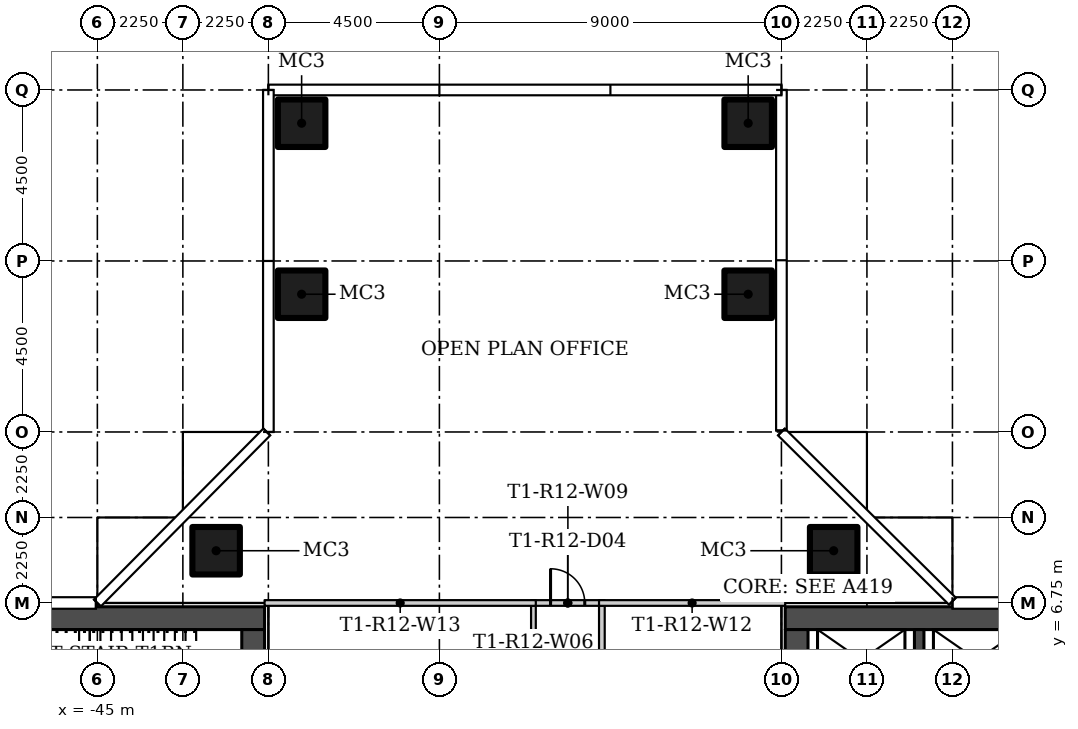
"""IFC4 building model, lengths in metres.
Left out: names, types, materials, properties, quantities, classifications, styles, units other than length and angle.
Written with IfcOpenShell. Run it as: python <this file> out.ifc"""

import sys

from ifc_helpers import new_model, si_unit, direction, frame, frame_2d, origin, origin_2d, place, context, subcontext, project, spatial, rectangle, hollow_rectangle, extrude, element, fill, save


model = new_model("IFC4")
c1 = context("Model", 3, precision=1e-05, world=origin(), true_north=direction((0.0, 1.0)))
c2 = subcontext(c1, "Body", "Model", "MODEL_VIEW")
j1 = project(units=[si_unit("LENGTHUNIT", "METRE"), si_unit("PLANEANGLEUNIT", "RADIAN")], contexts=[c1])
p1 = place(None, origin())
s1 = spatial("IfcSite", under=j1, at=p1, CompositionType="ELEMENT")
p2 = place(p1, origin())
s2 = spatial("IfcBuilding", under=s1, at=p2, CompositionType="ELEMENT")
p3 = place(p2, frame((0.0, 0.0, 113.1)))
s3 = spatial("IfcBuildingStorey", under=s2, at=p3, CompositionType="ELEMENT", Elevation=113.1)
for number, where in (
    (1, (-25.625, 8.125, 0.0)),
    (2, (-41.875, 8.125, 0.0)),
    (3, (-39.625, 14.875, 0.0)),
    (4, (-39.625, 19.375, 0.0)),
    (5, (-27.875, 14.875, 0.0)),
    (6, (-27.875, 19.375, 0.0)),
):
    element("IfcColumn", number, at=place(p3, frame(where)), inside=s3, PredefinedType="COLUMN", context=c2, shape_type="SweptSolid", body=[
        extrude(hollow_rectangle(XDim=1.25, YDim=1.25, WallThickness=0.05, at=origin_2d()), origin(), (0.0, 0.0, 1.0), 3.55),
    ])
p4 = place(p3, frame((-31.725, 6.675, 0.0), z_axis=(0.0, 0.0, 1.0), x_axis=(0.0, -1.0, 0.0)))
e7 = element("IfcWall", 7, at=p4, inside=s3, PredefinedType="PARTITIONING", context=c2, shape_type="SweptSolid", body=[
    extrude(rectangle(XDim=4.15, YDim=0.15, at=frame_2d((2.075, 0.0))), origin(), (0.0, 0.0, 1.0), 3.55),
])
p5 = place(p3, frame((-33.525, 2.513, 0.0), z_axis=(0.0, 0.0, 1.0), x_axis=(0.0, 1.0, 0.0)))
e8 = element("IfcWall", 8, at=p5, inside=s3, PredefinedType="PARTITIONING", context=c2, shape_type="SweptSolid", body=[
    extrude(rectangle(XDim=4.162, YDim=0.125, at=frame_2d((2.081, 0.0))), origin(), (0.0, 0.0, 1.0), 3.55),
])
p6 = place(p3, frame((-33.588, 6.75, 0.0)))
e9 = element("IfcWall", 9, at=p6, inside=s3, PredefinedType="PARTITIONING", context=c2, shape_type="SweptSolid", body=[
    extrude(rectangle(XDim=1.938, YDim=0.15, at=frame_2d((0.969, 0.0))), origin(), (0.0, 0.0, 1.0), 3.55),
])
p7 = place(p6, frame((0.513, 0.0, 0.0)))
e10 = element("IfcOpeningElement", 10, at=p7, cuts=e9, PredefinedType="OPENING", context=c2, shape_type="SweptSolid", body=[
    extrude(rectangle(XDim=0.9, YDim=2.1, at=frame_2d((0.45, 1.05))), frame((0.0, 0.085, 0.0), z_axis=(0.0, -1.0, 0.0), x_axis=(1.0, 0.0, 0.0)), (0.0, 0.0, 1.0), 0.17),
])
p8 = place(p3, frame((-26.9, 6.75, 0.0), z_axis=(0.0, 0.0, 1.0), x_axis=(-1.0, 0.0, 0.0)))
e11 = element("IfcWall", 11, at=p8, inside=s3, PredefinedType="PARTITIONING", context=c2, shape_type="SweptSolid", body=[
    extrude(rectangle(XDim=4.9, YDim=0.15, at=frame_2d((2.45, 0.0))), origin(), (0.0, 0.0, 1.0), 3.55),
])
p9 = place(p3, frame((-33.463, 6.75, 0.0), z_axis=(0.0, 0.0, 1.0), x_axis=(-1.0, 0.0, 0.0)))
e12 = element("IfcWall", 12, at=p9, inside=s3, PredefinedType="PARTITIONING", context=c2, shape_type="SweptSolid", body=[
    extrude(rectangle(XDim=7.137, YDim=0.15, at=frame_2d((3.569, 0.0))), origin(), (0.0, 0.0, 1.0), 3.55),
])
p10 = place(p3, frame((-26.9, 6.35, 0.0)))
e13 = element("IfcWall", 13, at=p10, inside=s3, PredefinedType="SHEAR", context=c2, shape_type="SweptSolid", body=[
    extrude(rectangle(XDim=13.3, YDim=0.6, at=frame_2d((6.65, 0.0))), origin(), (0.0, 0.0, 1.0), 3.55),
])
p11 = place(p3, frame((-26.6, 6.05, 0.0), z_axis=(0.0, 0.0, 1.0), x_axis=(0.0, -1.0, 0.0)))
e14 = element("IfcWall", 14, at=p11, inside=s3, PredefinedType="SHEAR", context=c2, shape_type="SweptSolid", body=[
    extrude(rectangle(XDim=12.1, YDim=0.6, at=frame_2d((6.05, 0.0))), origin(), (0.0, 0.0, 1.0), 3.55),
])
p12 = place(p11, frame((3.9, 0.0, 0.0)))
e15 = element("IfcOpeningElement", 15, at=p12, cuts=e14, PredefinedType="OPENING", context=c2, shape_type="SweptSolid", body=[
    extrude(rectangle(XDim=1.8, YDim=2.4, at=frame_2d((0.9, 1.2))), frame((0.0, 0.31, 0.0), z_axis=(0.0, -1.0, 0.0), x_axis=(1.0, 0.0, 0.0)), (0.0, 0.0, 1.0), 0.62),
])
p13 = place(p3, frame((-23.375, 3.25, 0.0), z_axis=(0.0, 0.0, 1.0), x_axis=(0.0, 1.0, 0.0)))
e16 = element("IfcWall", 16, at=p13, inside=s3, PredefinedType="SHEAR", context=c2, shape_type="SweptSolid", body=[
    extrude(rectangle(XDim=2.8, YDim=0.25, at=frame_2d((1.4, 0.0))), origin(), (0.0, 0.0, 1.0), 3.55),
])
p14 = place(p3, frame((-40.6, 6.35, 0.0), z_axis=(0.0, 0.0, 1.0), x_axis=(-1.0, 0.0, 0.0)))
e17 = element("IfcWall", 17, at=p14, inside=s3, PredefinedType="SHEAR", context=c2, shape_type="SweptSolid", body=[
    extrude(rectangle(XDim=13.3, YDim=0.6, at=frame_2d((6.65, 0.0))), origin(), (0.0, 0.0, 1.0), 3.55),
])
p15 = place(p3, frame((-40.9, -6.05, 0.0), z_axis=(0.0, 0.0, 1.0), x_axis=(0.0, 1.0, 0.0)))
e18 = element("IfcWall", 18, at=p15, inside=s3, PredefinedType="SHEAR", context=c2, shape_type="SweptSolid", body=[
    extrude(rectangle(XDim=12.1, YDim=0.6, at=frame_2d((6.05, 0.0))), origin(), (0.0, 0.0, 1.0), 3.55),
])
p16 = place(p15, frame((6.4, 0.0, 0.0)))
e19 = element("IfcOpeningElement", 19, at=p16, cuts=e18, PredefinedType="OPENING", context=c2, shape_type="SweptSolid", body=[
    extrude(rectangle(XDim=1.8, YDim=2.4, at=frame_2d((0.9, 1.2))), frame((0.0, 0.31, 0.0), z_axis=(0.0, -1.0, 0.0), x_axis=(1.0, 0.0, 0.0)), (0.0, 0.0, 1.0), 0.62),
])
p17 = place(p7, origin())
e20 = element("IfcDoor", 20, at=p17, inside=s3, OperationType="SINGLE_SWING_LEFT", PredefinedType="DOOR", context=c2, shape_type="SweptSolid", body=[
    extrude(rectangle(XDim=0.9, YDim=2.1, at=frame_2d((0.45, 1.05))), frame((0.0, 0.025, 0.0), z_axis=(0.0, -1.0, 0.0), x_axis=(1.0, 0.0, 0.0)), (0.0, 0.0, 1.0), 0.05),
])
fill(e10, e20)
save(model, sys.argv[1])
